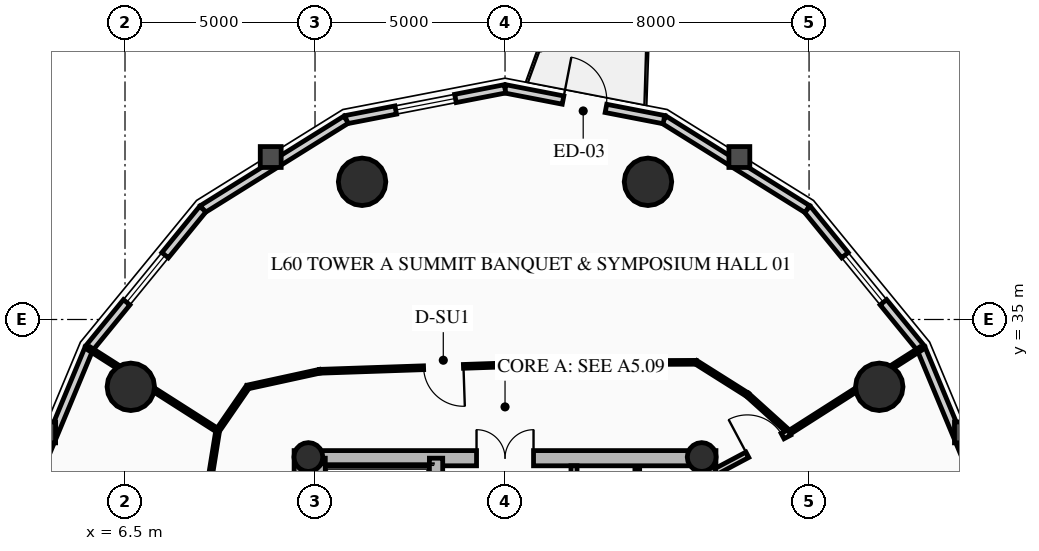
"""IFC4 building model, lengths in metres.
Left out: names, types, materials, properties, quantities, classifications, styles, units other than length and angle.
Written with IfcOpenShell. Run it as: python <this file> out.ifc"""

import sys

from ifc_helpers import new_model, si_unit, direction, frame, frame_2d, origin, origin_2d, place, context, subcontext, project, spatial, rectangle, circle, hollow_circle, extrude, source, transform, mapped, element, fill, save


model = new_model("IFC4")
c1 = context("Model", 3, precision=1e-05, world=origin(), true_north=direction((0.0, 1.0)))
c2 = subcontext(c1, "Body", "Model", "MODEL_VIEW")
j1 = project(units=[si_unit("LENGTHUNIT", "METRE"), si_unit("PLANEANGLEUNIT", "RADIAN")], contexts=[c1])
p1 = place(None, origin())
s1 = spatial("IfcSite", under=j1, at=p1, CompositionType="ELEMENT")
p2 = place(p1, origin())
s2 = spatial("IfcBuilding", under=s1, at=p2, CompositionType="ELEMENT")
p3 = place(p2, frame((0.0, 0.0, 189.43)))
s3 = spatial("IfcBuildingStorey", under=s2, at=p3, CompositionType="ELEMENT", Elevation=189.43)
for number, where, z_axis, x_axis in (
    (1, (11.15, 17.45, 0.0), (0.0, 0.0, 1.0), (0.0, 1.0, 0.0)),
    (2, (21.85, 17.45, 0.0), (0.0, 0.0, 1.0), (0.0, 1.0, 0.0)),
):
    element("IfcWall", number, at=place(p3, frame(where, z_axis=z_axis, x_axis=x_axis)), inside=s3, PredefinedType="SHEAR", context=c2, shape_type="SweptSolid", body=[
        extrude(rectangle(XDim=14.1, YDim=0.4, at=frame_2d((7.05, 0.0))), origin(), (0.0, 0.0, 1.0), 2.91),
    ])
p4 = place(p3, frame((11.15, 31.35, 0.0), z_axis=(0.0, 0.0, 1.0), x_axis=(1.0, 0.0, 0.0)))
e3 = element("IfcWall", 3, at=p4, inside=s3, PredefinedType="SHEAR", context=c2, shape_type="SweptSolid", body=[
    extrude(rectangle(XDim=10.7, YDim=0.4, at=frame_2d((5.35, 0.0))), origin(), (0.0, 0.0, 1.0), 2.91),
])
m1 = source(origin(), c2, "Body", "SweptSolid", [
    extrude(rectangle(XDim=1.5, YDim=2.02, at=frame_2d((0.75, 1.01))), frame((0.0, 0.21, 0.0), z_axis=(0.0, -1.0, 0.0), x_axis=(1.0, 0.0, 0.0)), (0.0, 0.0, 1.0), 0.42),
])
p5 = place(p4, frame((4.6, 0.0, 0.0)))
e4 = element("IfcOpeningElement", 4, at=p5, cuts=e3, PredefinedType="OPENING", context=c2, shape_type="MappedRepresentation", body=[
    mapped(m1, transform((0.0, 0.0, 0.0), x_axis=(1.0, 0.0, 0.0), y_axis=(0.0, 1.0, 0.0), z_axis=(0.0, 0.0, 1.0), scale=1.0)),
])
p6 = place(p3, frame((14.685, 17.65, 0.0), z_axis=(0.0, 0.0, 1.0), x_axis=(0.0, 1.0, 0.0)))
e5 = element("IfcWall", 5, at=p6, inside=s3, PredefinedType="SHEAR", context=c2, shape_type="SweptSolid", body=[
    extrude(rectangle(XDim=13.7, YDim=0.35, at=frame_2d((6.85, 0.0))), origin(), (0.0, 0.0, 1.0), 2.91),
])
m2 = source(origin(), c2, "Body", "SweptSolid", [
    extrude(rectangle(XDim=1.1, YDim=2.015, at=frame_2d((0.55, 1.007))), frame((0.0, 0.185, 0.0), z_axis=(0.0, -1.0, 0.0), x_axis=(1.0, 0.0, 0.0)), (0.0, 0.0, 1.0), 0.37),
])
p7 = place(p6, frame((4.85, 0.0, 0.0)))
e6 = element("IfcOpeningElement", 6, at=p7, cuts=e5, PredefinedType="OPENING", context=c2, shape_type="MappedRepresentation", body=[
    mapped(m2, transform((0.0, 0.0, 0.0), x_axis=(1.0, 0.0, 0.0), y_axis=(0.0, 1.0, 0.0), z_axis=(0.0, 0.0, 1.0), scale=1.0)),
])
p8 = place(p6, frame((0.625, 0.0, 0.0)))
e7 = element("IfcOpeningElement", 7, at=p8, cuts=e5, PredefinedType="OPENING", context=c2, shape_type="MappedRepresentation", body=[
    mapped(m2, transform((0.0, 0.0, 0.0), x_axis=(1.0, 0.0, 0.0), y_axis=(0.0, 1.0, 0.0), z_axis=(0.0, 0.0, 1.0), scale=1.0)),
])
p9 = place(p6, frame((2.625, 0.0, 0.0)))
e8 = element("IfcOpeningElement", 8, at=p9, cuts=e5, PredefinedType="OPENING", context=c2, shape_type="MappedRepresentation", body=[
    mapped(m2, transform((0.0, 0.0, 0.0), x_axis=(1.0, 0.0, 0.0), y_axis=(0.0, 1.0, 0.0), z_axis=(0.0, 0.0, 1.0), scale=1.0)),
])
m3 = source(origin(), c2, "Body", "SweptSolid", [
    extrude(rectangle(XDim=1.15, YDim=2.02, at=frame_2d((0.575, 1.01))), frame((0.0, 0.185, 0.0), z_axis=(0.0, -1.0, 0.0), x_axis=(1.0, 0.0, 0.0)), (0.0, 0.0, 1.0), 0.37),
])
p10 = place(p6, frame((7.27, 0.0, 0.0)))
e9 = element("IfcOpeningElement", 9, at=p10, cuts=e5, PredefinedType="OPENING", context=c2, shape_type="MappedRepresentation", body=[
    mapped(m3, transform((0.0, 0.0, 0.0), x_axis=(1.0, 0.0, 0.0), y_axis=(0.0, 1.0, 0.0), z_axis=(0.0, 0.0, 1.0), scale=1.0)),
])
p11 = place(p3, frame((11.595, 24.655, 0.0), z_axis=(0.0, 0.0, 1.0), x_axis=(0.0, 1.0, 0.0)))
e10 = element("IfcWall", 10, at=p11, inside=s3, PredefinedType="SHEAR", context=c2, shape_type="SweptSolid", body=[
    extrude(rectangle(XDim=6.695, YDim=0.35, at=frame_2d((3.348, 0.0))), origin(), (0.0, 0.0, 1.0), 2.91),
])
for number, where, z_axis, x_axis in (
    (11, (11.325, 31.38, 0.0), (0.0, 0.0, 1.0), (1.0, 0.0, 0.0)),
    (12, (21.675, 31.38, 0.0), (0.0, 0.0, 1.0), (1.0, 0.0, 0.0)),
):
    element("IfcColumn", number, at=place(p3, frame(where, z_axis=z_axis, x_axis=x_axis)), inside=s3, PredefinedType="COLUMN", context=c2, shape_type="SweptSolid", body=[
        extrude(hollow_circle(Radius=0.38, WallThickness=0.032, at=origin_2d()), origin(), (0.0, 0.0, 1.0), 2.91),
    ])
for number, where, z_axis, x_axis in (
    (13, (26.347, 33.229, 0.0), (0.0, 0.0, 1.0), (1.0, 0.0, 0.0)),
    (14, (20.261, 38.623, 0.0), (0.0, 0.0, 1.0), (1.0, 0.0, 0.0)),
    (15, (12.739, 38.623, 0.0), (0.0, 0.0, 1.0), (1.0, 0.0, 0.0)),
    (16, (6.653, 33.229, 0.0), (0.0, 0.0, 1.0), (1.0, 0.0, 0.0)),
):
    element("IfcColumn", number, at=place(p3, frame(where, z_axis=z_axis, x_axis=x_axis)), inside=s3, PredefinedType="USERDEFINED", context=c2, shape_type="SweptSolid", body=[
        extrude(circle(Radius=0.625, at=origin_2d()), origin(), (0.0, 0.0, 1.0), 2.91),
    ])
p12 = place(p3, frame((27.447, 34.24, 0.0), z_axis=(0.0, 0.0, 1.0), x_axis=(0.384144094086, -0.923273152961, 0.0)))
e17 = element("IfcWall", 17, at=p12, inside=s3, PredefinedType="SOLIDWALL", context=c2, shape_type="SweptSolid", body=[
    extrude(rectangle(XDim=5.003, YDim=0.22, at=frame_2d((2.501, 0.0))), origin(), (0.0, 0.0, 1.0), 2.125),
])
p13 = place(p3, frame((24.453, 37.906, 0.0), z_axis=(0.0, 0.0, 1.0), x_axis=(0.632470615287, -0.774584353572, 0.0)))
e18 = element("IfcWall", 18, at=p13, inside=s3, PredefinedType="SOLIDWALL", context=c2, shape_type="SweptSolid", body=[
    extrude(rectangle(XDim=4.733, YDim=0.22, at=frame_2d((2.366, 0.0))), origin(), (0.0, 0.0, 1.0), 2.125),
])
m4 = source(origin(), c2, "Body", "SweptSolid", [
    extrude(rectangle(XDim=1.6, YDim=1.3, at=frame_2d((0.8, 0.65))), frame((0.0, 0.12, 0.0), z_axis=(0.0, -1.0, 0.0), x_axis=(1.0, 0.0, 0.0)), (0.0, 0.0, 1.0), 0.24),
])
p14 = place(p13, frame((1.566, 0.0, 0.65)))
e19 = element("IfcOpeningElement", 19, at=p14, cuts=e18, PredefinedType="OPENING", context=c2, shape_type="MappedRepresentation", body=[
    mapped(m4, transform((0.0, 0.0, 0.0), x_axis=(1.0, 0.0, 0.0), y_axis=(0.0, 1.0, 0.0), z_axis=(0.0, 0.0, 1.0), scale=1.0)),
])
p15 = place(p3, frame((20.681, 40.259, 0.0), z_axis=(0.0, 0.0, 1.0), x_axis=(0.848399108042, -0.529357113368, 0.0)))
e20 = element("IfcWall", 20, at=p15, inside=s3, PredefinedType="SOLIDWALL", context=c2, shape_type="SweptSolid", body=[
    extrude(rectangle(XDim=4.446, YDim=0.22, at=frame_2d((2.223, 0.0))), origin(), (0.0, 0.0, 1.0), 2.125),
])
p16 = place(p3, frame((16.5, 41.07, 0.0), z_axis=(0.0, 0.0, 1.0), x_axis=(0.981703883443, -0.190413983815, 0.0)))
e21 = element("IfcWall", 21, at=p16, inside=s3, PredefinedType="SOLIDWALL", context=c2, shape_type="SweptSolid", body=[
    extrude(rectangle(XDim=4.259, YDim=0.22, at=frame_2d((2.13, 0.0))), origin(), (0.0, 0.0, 1.0), 2.125),
])
m5 = source(origin(), c2, "Body", "SweptSolid", [
    extrude(rectangle(XDim=1.15, YDim=2.005, at=frame_2d((0.575, 1.002))), frame((0.0, 0.12, 0.0), z_axis=(0.0, -1.0, 0.0), x_axis=(1.0, 0.0, 0.0)), (0.0, 0.0, 1.0), 0.24),
])
p17 = place(p16, frame((1.555, 0.0, 0.0)))
e22 = element("IfcOpeningElement", 22, at=p17, cuts=e21, PredefinedType="OPENING", context=c2, shape_type="MappedRepresentation", body=[
    mapped(m5, transform((0.0, 0.0, 0.0), x_axis=(1.0, 0.0, 0.0), y_axis=(0.0, 1.0, 0.0), z_axis=(0.0, 0.0, 1.0), scale=1.0)),
])
p18 = place(p3, frame((12.319, 40.259, 0.0), z_axis=(0.0, 0.0, 1.0), x_axis=(0.981703883443, 0.190413983815, 0.0)))
e23 = element("IfcWall", 23, at=p18, inside=s3, PredefinedType="SOLIDWALL", context=c2, shape_type="SweptSolid", body=[
    extrude(rectangle(XDim=4.259, YDim=0.22, at=frame_2d((2.13, 0.0))), origin(), (0.0, 0.0, 1.0), 2.125),
])
p19 = place(p18, frame((1.33, 0.0, 0.65)))
e24 = element("IfcOpeningElement", 24, at=p19, cuts=e23, PredefinedType="OPENING", context=c2, shape_type="MappedRepresentation", body=[
    mapped(m4, transform((0.0, 0.0, 0.0), x_axis=(1.0, 0.0, 0.0), y_axis=(0.0, 1.0, 0.0), z_axis=(0.0, 0.0, 1.0), scale=1.0)),
])
p20 = place(p3, frame((8.547, 37.906, 0.0), z_axis=(0.0, 0.0, 1.0), x_axis=(0.848399108042, 0.529357113368, 0.0)))
e25 = element("IfcWall", 25, at=p20, inside=s3, PredefinedType="SOLIDWALL", context=c2, shape_type="SweptSolid", body=[
    extrude(rectangle(XDim=4.446, YDim=0.22, at=frame_2d((2.223, 0.0))), origin(), (0.0, 0.0, 1.0), 2.125),
])
p21 = place(p3, frame((5.553, 34.24, 0.0), z_axis=(0.0, 0.0, 1.0), x_axis=(0.632470615287, 0.774584353572, 0.0)))
e26 = element("IfcWall", 26, at=p21, inside=s3, PredefinedType="SOLIDWALL", context=c2, shape_type="SweptSolid", body=[
    extrude(rectangle(XDim=4.733, YDim=0.22, at=frame_2d((2.366, 0.0))), origin(), (0.0, 0.0, 1.0), 2.125),
])
p22 = place(p21, frame((1.566, 0.0, 0.65)))
e27 = element("IfcOpeningElement", 27, at=p22, cuts=e26, PredefinedType="OPENING", context=c2, shape_type="MappedRepresentation", body=[
    mapped(m4, transform((0.0, 0.0, 0.0), x_axis=(1.0, 0.0, 0.0), y_axis=(0.0, 1.0, 0.0), z_axis=(0.0, 0.0, 1.0), scale=1.0)),
])
p23 = place(p3, frame((3.631, 29.62, 0.0), z_axis=(0.0, 0.0, 1.0), x_axis=(0.384144094086, 0.923273152961, 0.0)))
e28 = element("IfcWall", 28, at=p23, inside=s3, PredefinedType="SOLIDWALL", context=c2, shape_type="SweptSolid", body=[
    extrude(rectangle(XDim=5.003, YDim=0.22, at=frame_2d((2.501, 0.0))), origin(), (0.0, 0.0, 1.0), 2.125),
])
p24 = place(p3, frame((18.315, 27.25, 0.0), z_axis=(0.0, 0.0, 1.0), x_axis=(0.0, 1.0, 0.0)))
e29 = element("IfcWall", 29, at=p24, inside=s3, PredefinedType="PARTITIONING", context=c2, shape_type="SweptSolid", body=[
    extrude(rectangle(XDim=3.9, YDim=0.16, at=frame_2d((1.95, 0.0))), origin(), (0.0, 0.0, 1.0), 2.555),
])
m6 = source(origin(), c2, "Body", "SweptSolid", [
    extrude(rectangle(XDim=0.9, YDim=2.005, at=frame_2d((0.45, 1.002))), frame((0.0, 0.09, 0.0), z_axis=(0.0, -1.0, 0.0), x_axis=(1.0, 0.0, 0.0)), (0.0, 0.0, 1.0), 0.18),
])
p25 = place(p24, frame((2.2, 0.0, 0.0)))
e30 = element("IfcOpeningElement", 30, at=p25, cuts=e29, PredefinedType="OPENING", context=c2, shape_type="MappedRepresentation", body=[
    mapped(m6, transform((0.0, 0.0, 0.0), x_axis=(1.0, 0.0, 0.0), y_axis=(0.0, 1.0, 0.0), z_axis=(0.0, 0.0, 1.0), scale=1.0)),
])
p26 = place(p3, frame((19.98, 27.3, 0.0), z_axis=(0.0, 0.0, 1.0), x_axis=(0.0, 1.0, 0.0)))
e31 = element("IfcWall", 31, at=p26, inside=s3, PredefinedType="PARTITIONING", context=c2, shape_type="SweptSolid", body=[
    extrude(rectangle(XDim=3.82, YDim=0.125, at=frame_2d((1.91, 0.0))), origin(), (0.0, 0.0, 1.0), 2.555),
])
m7 = source(origin(), c2, "Body", "SweptSolid", [
    extrude(rectangle(XDim=0.9, YDim=2.005, at=frame_2d((0.45, 1.002))), frame((0.0, 0.073, 0.0), z_axis=(0.0, -1.0, 0.0), x_axis=(1.0, 0.0, 0.0)), (0.0, 0.0, 1.0), 0.145),
])
p27 = place(p26, frame((1.45, 0.0, 0.0)))
e32 = element("IfcOpeningElement", 32, at=p27, cuts=e31, PredefinedType="OPENING", context=c2, shape_type="MappedRepresentation", body=[
    mapped(m7, transform((0.0, 0.0, 0.0), x_axis=(1.0, 0.0, 0.0), y_axis=(0.0, 1.0, 0.0), z_axis=(0.0, 0.0, 1.0), scale=1.0)),
])
p28 = place(p3, frame((23.98, 32.027, 0.0), z_axis=(0.0, 0.0, 1.0), x_axis=(-0.742353224332, 0.670008724065, 0.0)))
e33 = element("IfcWall", 33, at=p28, inside=s3, PredefinedType="MOVABLE", context=c2, shape_type="SweptSolid", body=[
    extrude(rectangle(XDim=1.485, YDim=0.1, at=frame_2d((0.742, 0.0))), origin(), (0.0, 0.0, 1.0), 2.125),
])
p29 = place(p3, frame((22.877, 33.022, 0.0), z_axis=(0.0, 0.0, 1.0), x_axis=(-0.845895608855, 0.533348496689, 0.0)))
e34 = element("IfcWall", 34, at=p29, inside=s3, PredefinedType="MOVABLE", context=c2, shape_type="SweptSolid", body=[
    extrude(rectangle(XDim=1.597, YDim=0.1, at=frame_2d((0.798, 0.0))), origin(), (0.0, 0.0, 1.0), 2.125),
])
p30 = place(p3, frame((21.527, 33.873, 0.0), z_axis=(0.0, 0.0, 1.0), x_axis=(-0.999991838845, -0.004040079574, 0.0)))
e35 = element("IfcWall", 35, at=p30, inside=s3, PredefinedType="MOVABLE", context=c2, shape_type="SweptSolid", body=[
    extrude(rectangle(XDim=3.384, YDim=0.1, at=frame_2d((1.692, 0.0))), origin(), (0.0, 0.0, 1.0), 2.125),
])
p31 = place(p3, frame((18.143, 33.86, 0.0), z_axis=(0.0, 0.0, 1.0), x_axis=(-0.999419208319, -0.034077060363, 0.0)))
e36 = element("IfcWall", 36, at=p31, inside=s3, PredefinedType="MOVABLE", context=c2, shape_type="SweptSolid", body=[
    extrude(rectangle(XDim=6.527, YDim=0.1, at=frame_2d((3.263, 0.0))), origin(), (0.0, 0.0, 1.0), 2.125),
])
m8 = source(origin(), c2, "Body", "SweptSolid", [
    extrude(rectangle(XDim=1.05, YDim=2.015, at=frame_2d((0.525, 1.007))), frame((0.0, 0.06, 0.0), z_axis=(0.0, -1.0, 0.0), x_axis=(1.0, 0.0, 0.0)), (0.0, 0.0, 1.0), 0.12),
])
p32 = place(p31, frame((2.738, 0.0, 0.0)))
e37 = element("IfcOpeningElement", 37, at=p32, cuts=e36, PredefinedType="OPENING", context=c2, shape_type="MappedRepresentation", body=[
    mapped(m8, transform((0.0, 0.0, 0.0), x_axis=(1.0, 0.0, 0.0), y_axis=(0.0, 1.0, 0.0), z_axis=(0.0, 0.0, 1.0), scale=1.0)),
])
p33 = place(p3, frame((11.62, 33.637, 0.0), z_axis=(0.0, 0.0, 1.0), x_axis=(-0.97702579435, -0.213121085711, 0.0)))
e38 = element("IfcWall", 38, at=p33, inside=s3, PredefinedType="MOVABLE", context=c2, shape_type="SweptSolid", body=[
    extrude(rectangle(XDim=1.935, YDim=0.1, at=frame_2d((0.967, 0.0))), origin(), (0.0, 0.0, 1.0), 2.125),
])
p34 = place(p3, frame((9.729, 33.225, 0.0), z_axis=(0.0, 0.0, 1.0), x_axis=(-0.567183649484, -0.82359134755, 0.0)))
e39 = element("IfcWall", 39, at=p34, inside=s3, PredefinedType="MOVABLE", context=c2, shape_type="SweptSolid", body=[
    extrude(rectangle(XDim=1.392, YDim=0.1, at=frame_2d((0.696, 0.0))), origin(), (0.0, 0.0, 1.0), 2.125),
])
p35 = place(p3, frame((8.94, 32.078, 0.0), z_axis=(0.0, 0.0, 1.0), x_axis=(-0.159148467753, -0.98725466077, 0.0)))
e40 = element("IfcWall", 40, at=p35, inside=s3, PredefinedType="MOVABLE", context=c2, shape_type="SweptSolid", body=[
    extrude(rectangle(XDim=1.554, YDim=0.1, at=frame_2d((0.777, 0.0))), origin(), (0.0, 0.0, 1.0), 2.125),
])
p36 = place(p3, frame((23.98, 32.027, 0.0), z_axis=(0.0, 0.0, 1.0), x_axis=(0.843120722145, 0.53772432332, 0.0)))
e41 = element("IfcWall", 41, at=p36, inside=s3, PredefinedType="MOVABLE", context=c2, shape_type="SweptSolid", body=[
    extrude(rectangle(XDim=4.093, YDim=0.1, at=frame_2d((2.046, 0.0))), origin(), (0.0, 0.0, 1.0), 2.125),
])
p37 = place(p3, frame((8.94, 32.078, 0.0), z_axis=(0.0, 0.0, 1.0), x_axis=(-0.843153138911, 0.53767349232, 0.0)))
e42 = element("IfcWall", 42, at=p37, inside=s3, PredefinedType="MOVABLE", context=c2, shape_type="SweptSolid", body=[
    extrude(rectangle(XDim=3.998, YDim=0.1, at=frame_2d((1.999, 0.0))), origin(), (0.0, 0.0, 1.0), 2.125),
])
p38 = place(p3, frame((22.05, 31.0, 0.0), z_axis=(0.0, 0.0, 1.0), x_axis=(0.882791584709, 0.469764853908, 0.0)))
e43 = element("IfcWall", 43, at=p38, inside=s3, PredefinedType="PARTITIONING", context=c2, shape_type="SweptSolid", body=[
    extrude(rectangle(XDim=2.186, YDim=0.16, at=frame_2d((1.093, 0.0))), origin(), (0.0, 0.0, 1.0), 2.125),
])
m9 = source(origin(), c2, "Body", "SweptSolid", [
    extrude(rectangle(XDim=1.05, YDim=2.015, at=frame_2d((0.525, 1.007))), frame((0.0, 0.09, 0.0), z_axis=(0.0, -1.0, 0.0), x_axis=(1.0, 0.0, 0.0)), (0.0, 0.0, 1.0), 0.18),
])
p39 = place(p38, frame((0.936, 0.0, 0.0)))
e44 = element("IfcOpeningElement", 44, at=p39, cuts=e43, PredefinedType="OPENING", context=c2, shape_type="MappedRepresentation", body=[
    mapped(m9, transform((0.0, 0.0, 0.0), x_axis=(1.0, 0.0, 0.0), y_axis=(0.0, 1.0, 0.0), z_axis=(0.0, 0.0, 1.0), scale=1.0)),
])
m10 = source(origin(), c2, "Body", "SweptSolid", [
    extrude(rectangle(XDim=1.6, YDim=1.3, at=frame_2d((0.8, 0.65))), frame((0.0, 0.03, 0.0), z_axis=(0.0, -1.0, 0.0), x_axis=(1.0, 0.0, 0.0)), (0.0, 0.0, 1.0), 0.06),
])
p40 = place(p14, origin())
e45 = element("IfcWindow", 45, at=p40, inside=s3, PartitioningType="SINGLE_PANEL", PredefinedType="WINDOW", context=c2, shape_type="MappedRepresentation", body=[
    mapped(m10, transform((0.0, 0.0, 0.0), x_axis=(1.0, 0.0, 0.0), y_axis=(0.0, 1.0, 0.0), z_axis=(0.0, 0.0, 1.0), scale=1.0)),
])
fill(e19, e45)
m11 = source(origin(), c2, "Body", "SweptSolid", [
    extrude(rectangle(XDim=1.15, YDim=2.005, at=frame_2d((0.575, 1.002))), frame((0.0, 0.025, 0.0), z_axis=(0.0, -1.0, 0.0), x_axis=(1.0, 0.0, 0.0)), (0.0, 0.0, 1.0), 0.05),
])
p41 = place(p17, origin())
e46 = element("IfcDoor", 46, at=p41, inside=s3, OperationType="SINGLE_SWING_LEFT", PredefinedType="DOOR", context=c2, shape_type="MappedRepresentation", body=[
    mapped(m11, transform((0.0, 0.0, 0.0), x_axis=(1.0, 0.0, 0.0), y_axis=(0.0, 1.0, 0.0), z_axis=(0.0, 0.0, 1.0), scale=1.0)),
])
fill(e22, e46)
p42 = place(p19, origin())
e47 = element("IfcWindow", 47, at=p42, inside=s3, PartitioningType="SINGLE_PANEL", PredefinedType="WINDOW", context=c2, shape_type="MappedRepresentation", body=[
    mapped(m10, transform((0.0, 0.0, 0.0), x_axis=(1.0, 0.0, 0.0), y_axis=(0.0, 1.0, 0.0), z_axis=(0.0, 0.0, 1.0), scale=1.0)),
])
fill(e24, e47)
p43 = place(p22, origin())
e48 = element("IfcWindow", 48, at=p43, inside=s3, PartitioningType="SINGLE_PANEL", PredefinedType="WINDOW", context=c2, shape_type="MappedRepresentation", body=[
    mapped(m10, transform((0.0, 0.0, 0.0), x_axis=(1.0, 0.0, 0.0), y_axis=(0.0, 1.0, 0.0), z_axis=(0.0, 0.0, 1.0), scale=1.0)),
])
fill(e27, e48)
m12 = source(origin(), c2, "Body", "SweptSolid", [
    extrude(rectangle(XDim=1.5, YDim=2.02, at=frame_2d((0.75, 1.01))), frame((0.0, 0.025, 0.0), z_axis=(0.0, -1.0, 0.0), x_axis=(1.0, 0.0, 0.0)), (0.0, 0.0, 1.0), 0.05),
])
p44 = place(p5, origin())
e49 = element("IfcDoor", 49, at=p44, inside=s3, OperationType="DOUBLE_DOOR_SINGLE_SWING", PredefinedType="DOOR", context=c2, shape_type="MappedRepresentation", body=[
    mapped(m12, transform((0.0, 0.0, 0.0), x_axis=(1.0, 0.0, 0.0), y_axis=(0.0, 1.0, 0.0), z_axis=(0.0, 0.0, 1.0), scale=1.0)),
])
fill(e4, e49)
m13 = source(origin(), c2, "Body", "SweptSolid", [
    extrude(rectangle(XDim=1.05, YDim=2.015, at=frame_2d((0.525, 1.007))), frame((0.0, 0.025, 0.0), z_axis=(0.0, -1.0, 0.0), x_axis=(1.0, 0.0, 0.0)), (0.0, 0.0, 1.0), 0.05),
])
p45 = place(p39, origin())
e50 = element("IfcDoor", 50, at=p45, inside=s3, OperationType="SINGLE_SWING_LEFT", PredefinedType="DOOR", context=c2, shape_type="MappedRepresentation", body=[
    mapped(m13, transform((0.0, 0.0, 0.0), x_axis=(1.0, 0.0, 0.0), y_axis=(0.0, 1.0, 0.0), z_axis=(0.0, 0.0, 1.0), scale=1.0)),
])
fill(e44, e50)
p46 = place(p32, origin())
e51 = element("IfcDoor", 51, at=p46, inside=s3, OperationType="SINGLE_SWING_LEFT", PredefinedType="DOOR", context=c2, shape_type="MappedRepresentation", body=[
    mapped(m13, transform((0.0, 0.0, 0.0), x_axis=(1.0, 0.0, 0.0), y_axis=(0.0, 1.0, 0.0), z_axis=(0.0, 0.0, 1.0), scale=1.0)),
])
fill(e37, e51)
save(model, sys.argv[1])
